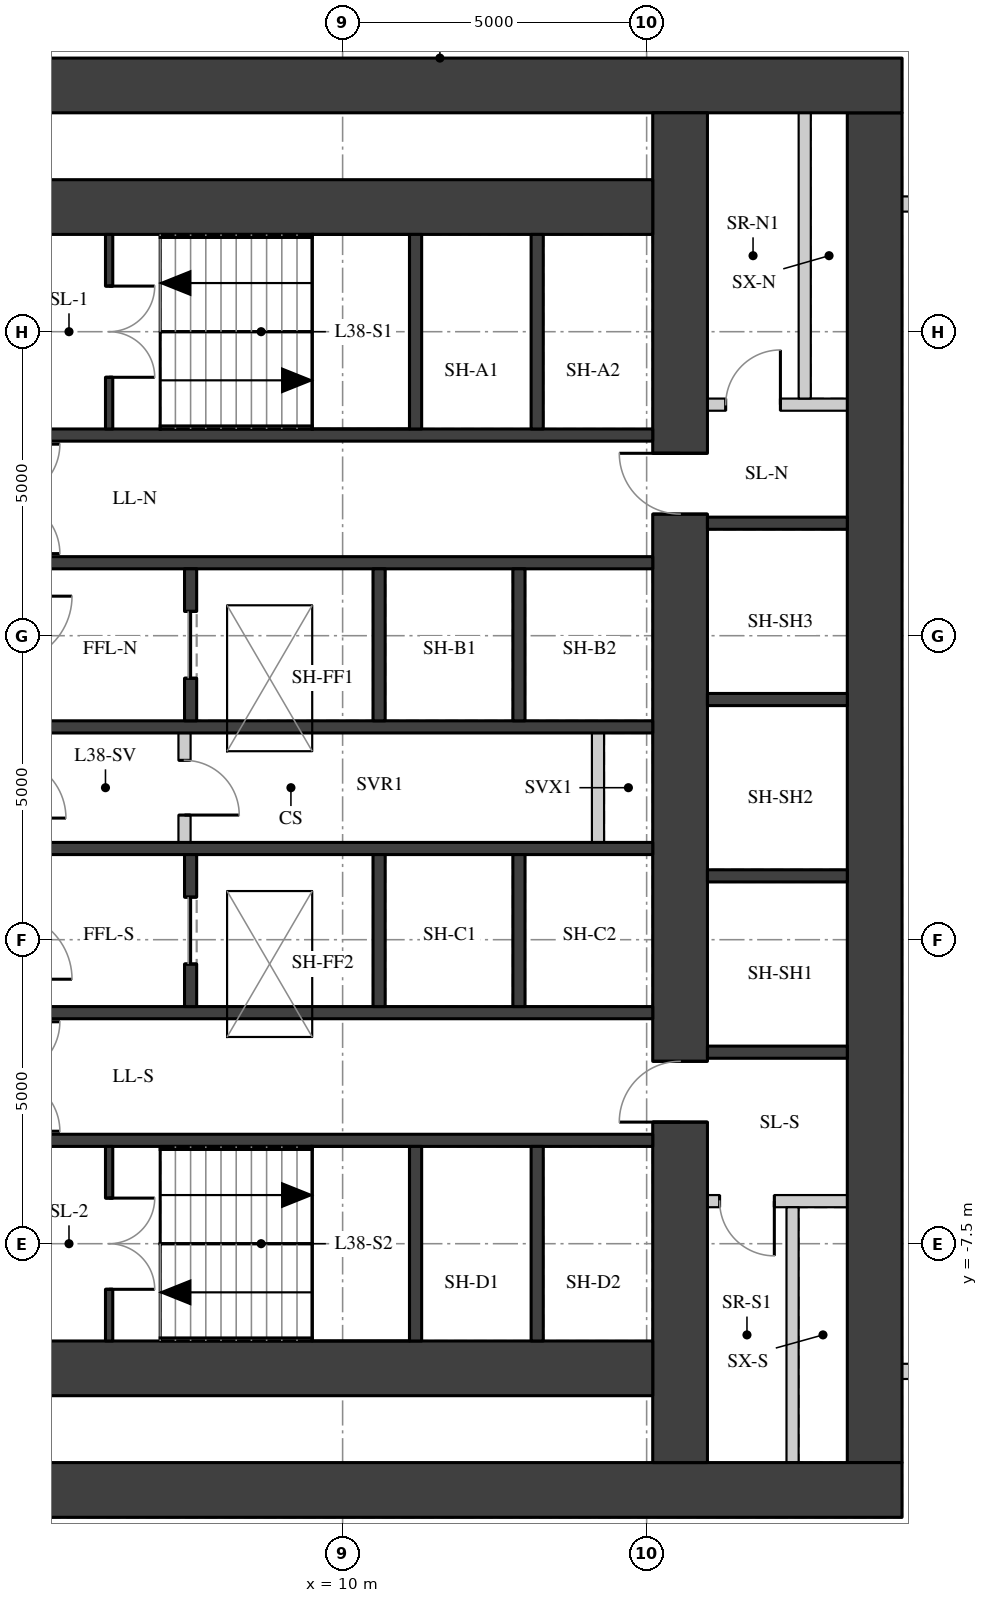
"""IFC4 building model, lengths in metres.
Left out: names, types, materials, properties, quantities, classifications, styles, units other than length and angle.
Written with IfcOpenShell. Run it as: python <this file> out.ifc"""

import sys

from ifc_helpers import new_model, si_unit, direction, frame, frame_2d, origin, place, context, subcontext, project, spatial, rectangle, extrude, element, fill, save


model = new_model("IFC4")
c1 = context("Model", 3, precision=1e-05, world=origin(), true_north=direction((0.0, 1.0)))
c2 = subcontext(c1, "Body", "Model", "MODEL_VIEW")
j1 = project(units=[si_unit("LENGTHUNIT", "METRE"), si_unit("PLANEANGLEUNIT", "RADIAN")], contexts=[c1])
p1 = place(None, origin())
s1 = spatial("IfcSite", under=j1, at=p1, CompositionType="ELEMENT")
p2 = place(p1, origin())
s2 = spatial("IfcBuilding", under=s1, at=p2, CompositionType="ELEMENT")
p3 = place(p2, frame((0.0, 0.0, 135.1)))
s3 = spatial("IfcBuildingStorey", under=s2, at=p3, CompositionType="ELEMENT", Elevation=135.1)
p4 = place(p3, frame((18.75, -11.1, 0.0), z_axis=(0.0, 0.0, 1.0), x_axis=(0.0, 1.0, 0.0)))
e1 = element("IfcWall", 1, at=p4, inside=s3, PredefinedType="SHEAR", context=c2, shape_type="SweptSolid", body=[
    extrude(rectangle(XDim=22.2, YDim=0.9, at=frame_2d((11.1, 0.0))), origin(), (0.0, 0.0, 1.0), 4.09),
])
for number, where, z_axis, x_axis in (
    (2, (4.0, 11.55, 0.0), (0.0, 0.0, 1.0), (1.0, 0.0, 0.0)),
    (3, (4.0, -11.55, 0.0), (0.0, 0.0, 1.0), (1.0, 0.0, 0.0)),
):
    element("IfcWall", number, at=place(p3, frame(where, z_axis=z_axis, x_axis=x_axis)), inside=s3, PredefinedType="SHEAR", context=c2, shape_type="SweptSolid", body=[
        extrude(rectangle(XDim=15.2, YDim=0.9, at=frame_2d((7.6, 0.0))), origin(), (0.0, 0.0, 1.0), 4.09),
    ])
p5 = place(p3, frame((15.55, -11.1, 0.0), z_axis=(0.0, 0.0, 1.0), x_axis=(0.0, 1.0, 0.0)))
e4 = element("IfcWall", 4, at=p5, inside=s3, PredefinedType="SHEAR", context=c2, shape_type="SweptSolid", body=[
    extrude(rectangle(XDim=22.2, YDim=0.9, at=frame_2d((11.1, 0.0))), origin(), (0.0, 0.0, 1.0), 4.09),
])
p6 = place(p5, frame((15.6, 0.0, 0.0)))
e5 = element("IfcOpeningElement", 5, at=p6, cuts=e4, PredefinedType="OPENING", context=c2, shape_type="SweptSolid", body=[
    extrude(rectangle(XDim=1.0, YDim=2.1, at=frame_2d((0.5, 1.05))), frame((0.0, 0.46, 0.0), z_axis=(0.0, -1.0, 0.0), x_axis=(1.0, 0.0, 0.0)), (0.0, 0.0, 1.0), 0.92),
])
p7 = place(p5, frame((5.6, 0.0, 0.0)))
e6 = element("IfcOpeningElement", 6, at=p7, cuts=e4, PredefinedType="OPENING", context=c2, shape_type="SweptSolid", body=[
    extrude(rectangle(XDim=1.0, YDim=2.1, at=frame_2d((0.5, 1.05))), frame((0.0, 0.46, 0.0), z_axis=(0.0, -1.0, 0.0), x_axis=(1.0, 0.0, 0.0)), (0.0, 0.0, 1.0), 0.92),
])
for number, where, z_axis, x_axis in (
    (7, (4.9, 9.55, 0.0), (0.0, 0.0, 1.0), (1.0, 0.0, 0.0)),
    (8, (4.9, -9.55, 0.0), (0.0, 0.0, 1.0), (1.0, 0.0, 0.0)),
):
    element("IfcWall", number, at=place(p3, frame(where, z_axis=z_axis, x_axis=x_axis)), inside=s3, PredefinedType="SHEAR", context=c2, shape_type="SweptSolid", body=[
        extrude(rectangle(XDim=10.2, YDim=0.9, at=frame_2d((5.1, 0.0))), origin(), (0.0, 0.0, 1.0), 4.09),
    ])
for number, where, z_axis, x_axis in (
    (9, (4.9, 5.8, 0.0), (0.0, 0.0, 1.0), (1.0, 0.0, 0.0)),
    (10, (4.9, 3.7, 0.0), (0.0, 0.0, 1.0), (1.0, 0.0, 0.0)),
    (11, (4.9, 1.0, 0.0), (0.0, 0.0, 1.0), (1.0, 0.0, 0.0)),
    (12, (4.9, -1.0, 0.0), (0.0, 0.0, 1.0), (1.0, 0.0, 0.0)),
    (13, (4.9, -3.7, 0.0), (0.0, 0.0, 1.0), (1.0, 0.0, 0.0)),
    (14, (4.9, -5.8, 0.0), (0.0, 0.0, 1.0), (1.0, 0.0, 0.0)),
):
    element("IfcWall", number, at=place(p3, frame(where, z_axis=z_axis, x_axis=x_axis)), inside=s3, PredefinedType="SHEAR", context=c2, shape_type="SweptSolid", body=[
        extrude(rectangle(XDim=10.2, YDim=0.2, at=frame_2d((5.1, 0.0))), origin(), (0.0, 0.0, 1.0), 4.09),
    ])
for number, where, z_axis, x_axis in (
    (15, (11.2, 5.9, 0.0), (0.0, 0.0, 1.0), (0.0, 1.0, 0.0)),
    (16, (11.2, -9.1, 0.0), (0.0, 0.0, 1.0), (0.0, 1.0, 0.0)),
    (17, (13.2, 5.9, 0.0), (0.0, 0.0, 1.0), (0.0, 1.0, 0.0)),
    (18, (13.2, -9.1, 0.0), (0.0, 0.0, 1.0), (0.0, 1.0, 0.0)),
):
    element("IfcWall", number, at=place(p3, frame(where, z_axis=z_axis, x_axis=x_axis)), inside=s3, PredefinedType="SHEAR", context=c2, shape_type="SweptSolid", body=[
        extrude(rectangle(XDim=3.2, YDim=0.2, at=frame_2d((1.6, 0.0))), origin(), (0.0, 0.0, 1.0), 4.09),
    ])
p8 = place(p3, frame((7.5, 1.1, 0.0), z_axis=(0.0, 0.0, 1.0), x_axis=(0.0, 1.0, 0.0)))
e19 = element("IfcWall", 19, at=p8, inside=s3, PredefinedType="SHEAR", context=c2, shape_type="SweptSolid", body=[
    extrude(rectangle(XDim=2.5, YDim=0.2, at=frame_2d((1.25, 0.0))), origin(), (0.0, 0.0, 1.0), 4.09),
])
p9 = place(p8, frame((0.7, 0.0, 0.0)))
e20 = element("IfcOpeningElement", 20, at=p9, cuts=e19, PredefinedType="OPENING", context=c2, shape_type="SweptSolid", body=[
    extrude(rectangle(XDim=1.1, YDim=2.1, at=frame_2d((0.55, 1.05))), frame((0.0, 0.11, 0.0), z_axis=(0.0, -1.0, 0.0), x_axis=(1.0, 0.0, 0.0)), (0.0, 0.0, 1.0), 0.22),
])
p10 = place(p3, frame((7.5, -3.6, 0.0), z_axis=(0.0, 0.0, 1.0), x_axis=(0.0, 1.0, 0.0)))
e21 = element("IfcWall", 21, at=p10, inside=s3, PredefinedType="SHEAR", context=c2, shape_type="SweptSolid", body=[
    extrude(rectangle(XDim=2.5, YDim=0.2, at=frame_2d((1.25, 0.0))), origin(), (0.0, 0.0, 1.0), 4.09),
])
p11 = place(p10, frame((0.7, 0.0, 0.0)))
e22 = element("IfcOpeningElement", 22, at=p11, cuts=e21, PredefinedType="OPENING", context=c2, shape_type="SweptSolid", body=[
    extrude(rectangle(XDim=1.1, YDim=2.1, at=frame_2d((0.55, 1.05))), frame((0.0, 0.11, 0.0), z_axis=(0.0, -1.0, 0.0), x_axis=(1.0, 0.0, 0.0)), (0.0, 0.0, 1.0), 0.22),
])
for number, where, z_axis, x_axis in (
    (23, (10.6, 1.1, 0.0), (0.0, 0.0, 1.0), (0.0, 1.0, 0.0)),
    (24, (10.6, -3.6, 0.0), (0.0, 0.0, 1.0), (0.0, 1.0, 0.0)),
    (25, (12.9, 1.1, 0.0), (0.0, 0.0, 1.0), (0.0, 1.0, 0.0)),
    (26, (12.9, -3.6, 0.0), (0.0, 0.0, 1.0), (0.0, 1.0, 0.0)),
):
    element("IfcWall", number, at=place(p3, frame(where, z_axis=z_axis, x_axis=x_axis)), inside=s3, PredefinedType="SHEAR", context=c2, shape_type="SweptSolid", body=[
        extrude(rectangle(XDim=2.5, YDim=0.2, at=frame_2d((1.25, 0.0))), origin(), (0.0, 0.0, 1.0), 4.09),
    ])
p12 = place(p3, frame((6.16, 5.9, 0.0), z_axis=(0.0, 0.0, 1.0), x_axis=(0.0, 1.0, 0.0)))
e27 = element("IfcWall", 27, at=p12, inside=s3, PredefinedType="SHEAR", context=c2, shape_type="SweptSolid", body=[
    extrude(rectangle(XDim=3.2, YDim=0.12, at=frame_2d((1.6, 0.0))), origin(), (0.0, 0.0, 1.0), 4.09),
])
p13 = place(p12, frame((0.85, 0.0, 0.0)))
e28 = element("IfcOpeningElement", 28, at=p13, cuts=e27, PredefinedType="OPENING", context=c2, shape_type="SweptSolid", body=[
    extrude(rectangle(XDim=1.5, YDim=2.1, at=frame_2d((0.75, 1.05))), frame((0.0, 0.07, 0.0), z_axis=(0.0, -1.0, 0.0), x_axis=(1.0, 0.0, 0.0)), (0.0, 0.0, 1.0), 0.14),
])
p14 = place(p3, frame((6.16, -9.1, 0.0), z_axis=(0.0, 0.0, 1.0), x_axis=(0.0, 1.0, 0.0)))
e29 = element("IfcWall", 29, at=p14, inside=s3, PredefinedType="SHEAR", context=c2, shape_type="SweptSolid", body=[
    extrude(rectangle(XDim=3.2, YDim=0.12, at=frame_2d((1.6, 0.0))), origin(), (0.0, 0.0, 1.0), 4.09),
])
p15 = place(p14, frame((0.85, 0.0, 0.0)))
e30 = element("IfcOpeningElement", 30, at=p15, cuts=e29, PredefinedType="OPENING", context=c2, shape_type="SweptSolid", body=[
    extrude(rectangle(XDim=1.5, YDim=2.1, at=frame_2d((0.75, 1.05))), frame((0.0, 0.07, 0.0), z_axis=(0.0, -1.0, 0.0), x_axis=(1.0, 0.0, 0.0)), (0.0, 0.0, 1.0), 0.14),
])
p16 = place(p3, frame((7.4, -0.9, 0.0), z_axis=(0.0, 0.0, 1.0), x_axis=(0.0, 1.0, 0.0)))
e31 = element("IfcWall", 31, at=p16, inside=s3, PredefinedType="PARTITIONING", context=c2, shape_type="SweptSolid", body=[
    extrude(rectangle(XDim=1.8, YDim=0.2, at=frame_2d((0.9, 0.0))), origin(), (0.0, 0.0, 1.0), 4.09),
])
p17 = place(p16, frame((0.45, 0.0, 0.0)))
e32 = element("IfcOpeningElement", 32, at=p17, cuts=e31, PredefinedType="OPENING", context=c2, shape_type="SweptSolid", body=[
    extrude(rectangle(XDim=0.9, YDim=2.1, at=frame_2d((0.45, 1.05))), frame((0.0, 0.11, 0.0), z_axis=(0.0, -1.0, 0.0), x_axis=(1.0, 0.0, 0.0)), (0.0, 0.0, 1.0), 0.22),
])
p18 = place(p3, frame((14.2, -0.9, 0.0), z_axis=(0.0, 0.0, 1.0), x_axis=(0.0, 1.0, 0.0)))
e33 = element("IfcWall", 33, at=p18, inside=s3, PredefinedType="PARTITIONING", context=c2, shape_type="SweptSolid", body=[
    extrude(rectangle(XDim=1.8, YDim=0.2, at=frame_2d((0.9, 0.0))), origin(), (0.0, 0.0, 1.0), 4.09),
])
for number, where, z_axis, x_axis in (
    (34, (16.0, -4.35, 0.0), (0.0, 0.0, 1.0), (1.0, 0.0, 0.0)),
    (35, (16.0, -1.45, 0.0), (0.0, 0.0, 1.0), (1.0, 0.0, 0.0)),
    (36, (16.0, 1.45, 0.0), (0.0, 0.0, 1.0), (1.0, 0.0, 0.0)),
    (37, (16.0, 4.35, 0.0), (0.0, 0.0, 1.0), (1.0, 0.0, 0.0)),
):
    element("IfcWall", number, at=place(p3, frame(where, z_axis=z_axis, x_axis=x_axis)), inside=s3, PredefinedType="SHEAR", context=c2, shape_type="SweptSolid", body=[
        extrude(rectangle(XDim=2.3, YDim=0.2, at=frame_2d((1.15, 0.0))), origin(), (0.0, 0.0, 1.0), 4.09),
    ])
p19 = place(p3, frame((16.0, 6.3, 0.0), z_axis=(0.0, 0.0, 1.0), x_axis=(1.0, 0.0, 0.0)))
e38 = element("IfcWall", 38, at=p19, inside=s3, PredefinedType="PARTITIONING", context=c2, shape_type="SweptSolid", body=[
    extrude(rectangle(XDim=2.3, YDim=0.2, at=frame_2d((1.15, 0.0))), origin(), (0.0, 0.0, 1.0), 4.09),
])
p20 = place(p19, frame((0.3, 0.0, 0.0)))
e39 = element("IfcOpeningElement", 39, at=p20, cuts=e38, PredefinedType="OPENING", context=c2, shape_type="SweptSolid", body=[
    extrude(rectangle(XDim=0.9, YDim=2.1, at=frame_2d((0.45, 1.05))), frame((0.0, 0.11, 0.0), z_axis=(0.0, -1.0, 0.0), x_axis=(1.0, 0.0, 0.0)), (0.0, 0.0, 1.0), 0.22),
])
p21 = place(p3, frame((17.6, 6.4, 0.0), z_axis=(0.0, 0.0, 1.0), x_axis=(0.0, 1.0, 0.0)))
e40 = element("IfcWall", 40, at=p21, inside=s3, PredefinedType="PARTITIONING", context=c2, shape_type="SweptSolid", body=[
    extrude(rectangle(XDim=4.7, YDim=0.2, at=frame_2d((2.35, 0.0))), origin(), (0.0, 0.0, 1.0), 4.09),
])
p22 = place(p3, frame((16.0, -6.8, 0.0), z_axis=(0.0, 0.0, 1.0), x_axis=(1.0, 0.0, 0.0)))
e41 = element("IfcWall", 41, at=p22, inside=s3, PredefinedType="PARTITIONING", context=c2, shape_type="SweptSolid", body=[
    extrude(rectangle(XDim=2.3, YDim=0.2, at=frame_2d((1.15, 0.0))), origin(), (0.0, 0.0, 1.0), 4.09),
])
p23 = place(p22, frame((0.2, 0.0, 0.0)))
e42 = element("IfcOpeningElement", 42, at=p23, cuts=e41, PredefinedType="OPENING", context=c2, shape_type="SweptSolid", body=[
    extrude(rectangle(XDim=0.9, YDim=2.1, at=frame_2d((0.45, 1.05))), frame((0.0, 0.11, 0.0), z_axis=(0.0, -1.0, 0.0), x_axis=(1.0, 0.0, 0.0)), (0.0, 0.0, 1.0), 0.22),
])
p24 = place(p3, frame((17.4, -11.1, 0.0), z_axis=(0.0, 0.0, 1.0), x_axis=(0.0, 1.0, 0.0)))
e43 = element("IfcWall", 43, at=p24, inside=s3, PredefinedType="PARTITIONING", context=c2, shape_type="SweptSolid", body=[
    extrude(rectangle(XDim=4.2, YDim=0.2, at=frame_2d((2.1, 0.0))), origin(), (0.0, 0.0, 1.0), 4.09),
])
p25 = place(p3, frame((19.198, -9.6, 0.0), z_axis=(0.0, 0.0, 1.0), x_axis=(1.0, 0.0, 0.0)))
e44 = element("IfcWall", 44, at=p25, inside=s3, PredefinedType="PARTITIONING", context=c2, shape_type="SweptSolid", body=[
    extrude(rectangle(XDim=4.03, YDim=0.25, at=frame_2d((2.015, 0.0))), origin(), (0.0, 0.0, 1.0), 4.09),
])
p26 = place(p3, frame((19.198, 9.6, 0.0), z_axis=(0.0, 0.0, 1.0), x_axis=(1.0, 0.0, 0.0)))
e45 = element("IfcWall", 45, at=p26, inside=s3, PredefinedType="PARTITIONING", context=c2, shape_type="SweptSolid", body=[
    extrude(rectangle(XDim=3.46, YDim=0.25, at=frame_2d((1.73, 0.0))), origin(), (0.0, 0.0, 1.0), 4.09),
])
p27 = place(p13, origin())
e46 = element("IfcDoor", 46, at=p27, inside=s3, OperationType="DOUBLE_DOOR_SINGLE_SWING", PredefinedType="DOOR", context=c2, shape_type="SweptSolid", body=[
    extrude(rectangle(XDim=1.5, YDim=2.1, at=frame_2d((0.75, 1.05))), frame((0.0, 0.025, 0.0), z_axis=(0.0, -1.0, 0.0), x_axis=(1.0, 0.0, 0.0)), (0.0, 0.0, 1.0), 0.05),
])
fill(e28, e46)
p28 = place(p15, origin())
e47 = element("IfcDoor", 47, at=p28, inside=s3, OperationType="DOUBLE_DOOR_SINGLE_SWING", PredefinedType="DOOR", context=c2, shape_type="SweptSolid", body=[
    extrude(rectangle(XDim=1.5, YDim=2.1, at=frame_2d((0.75, 1.05))), frame((0.0, 0.025, 0.0), z_axis=(0.0, -1.0, 0.0), x_axis=(1.0, 0.0, 0.0)), (0.0, 0.0, 1.0), 0.05),
])
fill(e30, e47)
p29 = place(p9, origin())
e48 = element("IfcDoor", 48, at=p29, inside=s3, OperationType="DOUBLE_DOOR_SLIDING", PredefinedType="DOOR", context=c2, shape_type="SweptSolid", body=[
    extrude(rectangle(XDim=1.1, YDim=2.1, at=frame_2d((0.55, 1.05))), frame((0.0, 0.025, 0.0), z_axis=(0.0, -1.0, 0.0), x_axis=(1.0, 0.0, 0.0)), (0.0, 0.0, 1.0), 0.05),
])
fill(e20, e48)
p30 = place(p11, origin())
e49 = element("IfcDoor", 49, at=p30, inside=s3, OperationType="DOUBLE_DOOR_SLIDING", PredefinedType="DOOR", context=c2, shape_type="SweptSolid", body=[
    extrude(rectangle(XDim=1.1, YDim=2.1, at=frame_2d((0.55, 1.05))), frame((0.0, 0.025, 0.0), z_axis=(0.0, -1.0, 0.0), x_axis=(1.0, 0.0, 0.0)), (0.0, 0.0, 1.0), 0.05),
])
fill(e22, e49)
p31 = place(p17, origin())
e50 = element("IfcDoor", 50, at=p31, inside=s3, OperationType="SINGLE_SWING_RIGHT", PredefinedType="DOOR", context=c2, shape_type="SweptSolid", body=[
    extrude(rectangle(XDim=0.9, YDim=2.1, at=frame_2d((0.45, 1.05))), frame((0.0, 0.025, 0.0), z_axis=(0.0, -1.0, 0.0), x_axis=(1.0, 0.0, 0.0)), (0.0, 0.0, 1.0), 0.05),
])
fill(e32, e50)
p32 = place(p6, origin())
e51 = element("IfcDoor", 51, at=p32, inside=s3, OperationType="SINGLE_SWING_RIGHT", PredefinedType="DOOR", context=c2, shape_type="SweptSolid", body=[
    extrude(rectangle(XDim=1.0, YDim=2.1, at=frame_2d((0.5, 1.05))), frame((0.0, 0.025, 0.0), z_axis=(0.0, -1.0, 0.0), x_axis=(1.0, 0.0, 0.0)), (0.0, 0.0, 1.0), 0.05),
])
fill(e5, e51)
p33 = place(p20, origin())
e52 = element("IfcDoor", 52, at=p33, inside=s3, OperationType="SINGLE_SWING_RIGHT", PredefinedType="DOOR", context=c2, shape_type="SweptSolid", body=[
    extrude(rectangle(XDim=0.9, YDim=2.1, at=frame_2d((0.45, 1.05))), frame((0.0, 0.025, 0.0), z_axis=(0.0, -1.0, 0.0), x_axis=(1.0, 0.0, 0.0)), (0.0, 0.0, 1.0), 0.05),
])
fill(e39, e52)
p34 = place(p7, origin())
e53 = element("IfcDoor", 53, at=p34, inside=s3, OperationType="SINGLE_SWING_LEFT", PredefinedType="DOOR", context=c2, shape_type="SweptSolid", body=[
    extrude(rectangle(XDim=1.0, YDim=2.1, at=frame_2d((0.5, 1.05))), frame((0.0, 0.025, 0.0), z_axis=(0.0, -1.0, 0.0), x_axis=(1.0, 0.0, 0.0)), (0.0, 0.0, 1.0), 0.05),
])
fill(e6, e53)
p35 = place(p23, origin())
e54 = element("IfcDoor", 54, at=p35, inside=s3, OperationType="SINGLE_SWING_LEFT", PredefinedType="DOOR", context=c2, shape_type="SweptSolid", body=[
    extrude(rectangle(XDim=0.9, YDim=2.1, at=frame_2d((0.45, 1.05))), frame((0.0, 0.025, 0.0), z_axis=(0.0, -1.0, 0.0), x_axis=(1.0, 0.0, 0.0)), (0.0, 0.0, 1.0), 0.05),
])
fill(e42, e54)
save(model, sys.argv[1])
